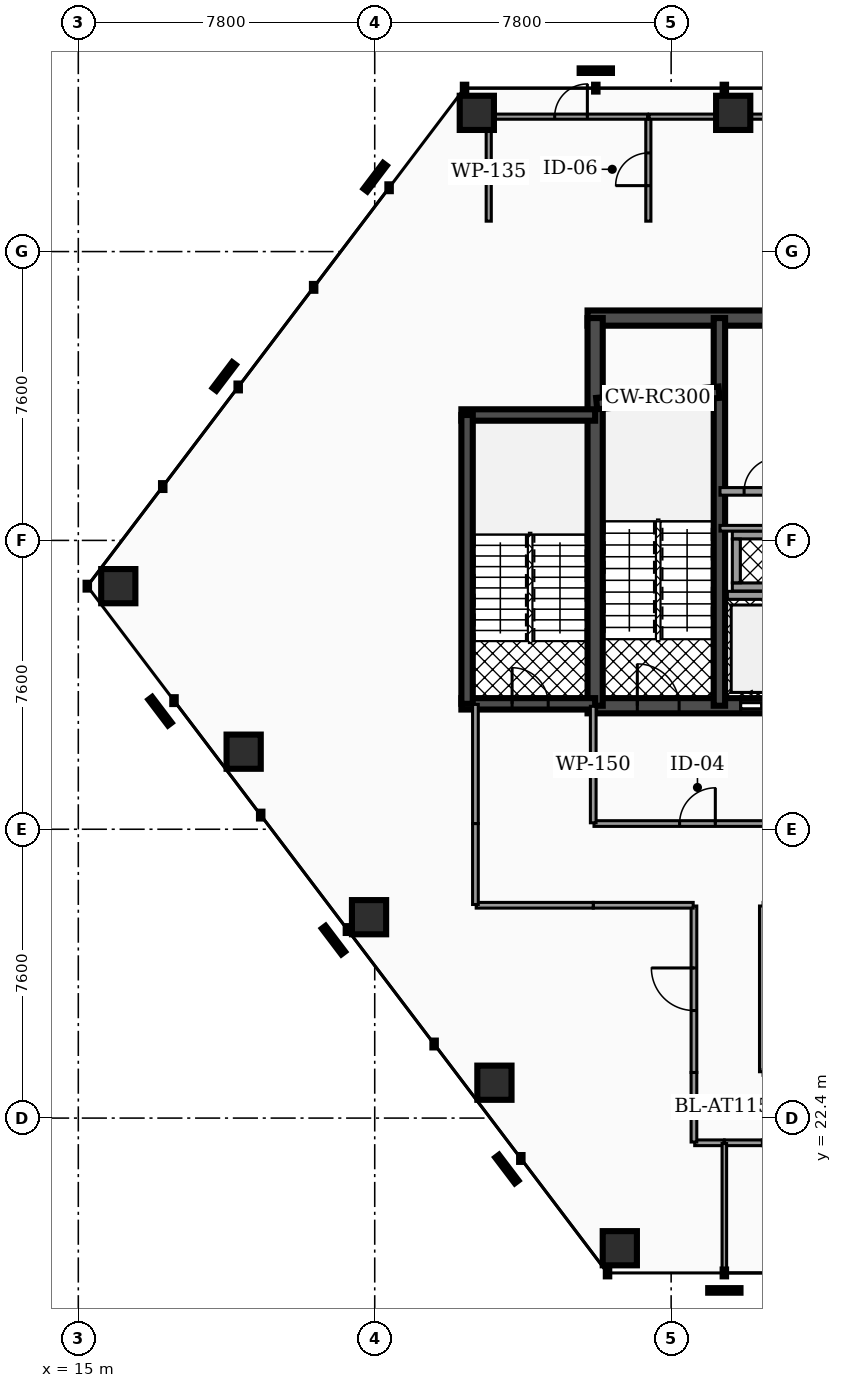
"""IFC4 building model, lengths in metres.
Left out: names, types, materials, properties, quantities, classifications, styles, units other than length and angle.
Written with IfcOpenShell. Run it as: python <this file> out.ifc"""

import sys

from ifc_helpers import new_model, si_unit, direction, frame, frame_2d, origin, origin_2d, place, context, subcontext, project, spatial, rectangle, hollow_rectangle, extrude, element, fill, save


model = new_model("IFC4")
c1 = context("Model", 3, precision=1e-05, world=origin(), true_north=direction((0.0, 1.0)))
c2 = subcontext(c1, "Body", "Model", "MODEL_VIEW")
j1 = project(units=[si_unit("LENGTHUNIT", "METRE"), si_unit("PLANEANGLEUNIT", "RADIAN")], contexts=[c1])
p1 = place(None, origin())
s1 = spatial("IfcSite", under=j1, at=p1, CompositionType="ELEMENT")
p2 = place(p1, origin())
s2 = spatial("IfcBuilding", under=s1, at=p2, CompositionType="ELEMENT")
p3 = place(p2, frame((0.0, 0.0, 100.98)))
s3 = spatial("IfcBuildingStorey", under=s2, at=p3, CompositionType="ELEMENT", Elevation=100.98)
p4 = place(p3, frame((28.4, 43.45, 0.0), z_axis=(0.0, 0.0, 1.0), x_axis=(1.0, 0.0, 0.0)))
e1 = element("IfcWall", 1, at=p4, inside=s3, PredefinedType="SHEAR", context=c2, shape_type="SweptSolid", body=[
    extrude(rectangle(XDim=20.06, YDim=0.4, at=frame_2d((10.03, 0.0))), origin(), (0.0, 0.0, 1.0), 3.82),
])
p5 = place(p3, frame((28.4, 33.25, 0.0), z_axis=(0.0, 0.0, 1.0), x_axis=(1.0, 0.0, 0.0)))
e2 = element("IfcWall", 2, at=p5, inside=s3, PredefinedType="SHEAR", context=c2, shape_type="SweptSolid", body=[
    extrude(rectangle(XDim=20.06, YDim=0.4, at=frame_2d((10.03, 0.0))), origin(), (0.0, 0.0, 1.0), 3.82),
])
p6 = place(p5, frame((4.03, 0.0, 0.0)))
e3 = element("IfcOpeningElement", 3, at=p6, cuts=e2, PredefinedType="OPENING", context=c2, shape_type="SweptSolid", body=[
    extrude(rectangle(XDim=1.1, YDim=2.15, at=frame_2d((0.55, 1.075))), frame((0.0, 0.21, 0.0), z_axis=(0.0, -1.0, 0.0), x_axis=(1.0, 0.0, 0.0)), (0.0, 0.0, 1.0), 0.42),
])
p7 = place(p5, frame((14.87, 0.0, 0.0)))
e4 = element("IfcOpeningElement", 4, at=p7, cuts=e2, PredefinedType="OPENING", context=c2, shape_type="SweptSolid", body=[
    extrude(rectangle(XDim=1.1, YDim=2.15, at=frame_2d((0.55, 1.075))), frame((0.0, 0.21, 0.0), z_axis=(0.0, -1.0, 0.0), x_axis=(1.0, 0.0, 0.0)), (0.0, 0.0, 1.0), 0.42),
])
p8 = place(p5, frame((1.31, 0.0, 0.0)))
e5 = element("IfcOpeningElement", 5, at=p8, cuts=e2, PredefinedType="OPENING", context=c2, shape_type="SweptSolid", body=[
    extrude(rectangle(XDim=1.1, YDim=2.2, at=frame_2d((0.55, 1.1))), frame((0.0, 0.21, 0.0), z_axis=(0.0, -1.0, 0.0), x_axis=(1.0, 0.0, 0.0)), (0.0, 0.0, 1.0), 0.42),
])
p9 = place(p5, frame((9.44, 0.0, 0.0)))
e6 = element("IfcOpeningElement", 6, at=p9, cuts=e2, PredefinedType="OPENING", context=c2, shape_type="SweptSolid", body=[
    extrude(rectangle(XDim=1.12, YDim=2.05, at=frame_2d((0.56, 1.025))), frame((0.0, 0.21, 0.0), z_axis=(0.0, -1.0, 0.0), x_axis=(1.0, 0.0, 0.0)), (0.0, 0.0, 1.0), 0.42),
])
p10 = place(p5, frame((17.65, 0.0, 0.0)))
e7 = element("IfcOpeningElement", 7, at=p10, cuts=e2, PredefinedType="OPENING", context=c2, shape_type="SweptSolid", body=[
    extrude(rectangle(XDim=1.1, YDim=2.2, at=frame_2d((0.55, 1.1))), frame((0.0, 0.21, 0.0), z_axis=(0.0, -1.0, 0.0), x_axis=(1.0, 0.0, 0.0)), (0.0, 0.0, 1.0), 0.42),
])
p11 = place(p3, frame((28.6, 33.25, 0.0), z_axis=(0.0, 0.0, 1.0), x_axis=(0.0, 1.0, 0.0)))
e8 = element("IfcWall", 8, at=p11, inside=s3, PredefinedType="SHEAR", context=c2, shape_type="SweptSolid", body=[
    extrude(rectangle(XDim=10.2, YDim=0.4, at=frame_2d((5.1, 0.0))), origin(), (0.0, 0.0, 1.0), 3.82),
])
p12 = place(p3, frame((31.87, 33.25, 0.0), z_axis=(0.0, 0.0, 1.0), x_axis=(0.0, 1.0, 0.0)))
e9 = element("IfcWall", 9, at=p12, inside=s3, PredefinedType="SHEAR", context=c2, shape_type="SweptSolid", body=[
    extrude(rectangle(XDim=10.2, YDim=0.3, at=frame_2d((5.1, 0.0))), origin(), (0.0, 0.0, 1.0), 3.82),
])
p13 = place(p3, frame((28.64, 41.2, 0.0), z_axis=(0.0, 0.0, 1.0), x_axis=(0.995687118776, 0.092774789157, 0.0)))
e10 = element("IfcWall", 10, at=p13, inside=s3, PredefinedType="SHEAR", context=c2, shape_type="SweptSolid", body=[
    extrude(rectangle(XDim=3.234, YDim=0.3, at=frame_2d((1.617, 0.0))), origin(), (0.0, 0.0, 1.0), 3.82),
])
p14 = place(p3, frame((25.08, 40.9, 0.0), z_axis=(0.0, 0.0, 1.0), x_axis=(1.0, 0.0, 0.0)))
e11 = element("IfcWall", 11, at=p14, inside=s3, PredefinedType="SHEAR", context=c2, shape_type="SweptSolid", body=[
    extrude(rectangle(XDim=3.52, YDim=0.3, at=frame_2d((1.76, 0.0))), origin(), (0.0, 0.0, 1.0), 3.82),
])
p15 = place(p3, frame((25.08, 33.3, 0.0), z_axis=(0.0, 0.0, 1.0), x_axis=(1.0, 0.0, 0.0)))
e12 = element("IfcWall", 12, at=p15, inside=s3, PredefinedType="SHEAR", context=c2, shape_type="SweptSolid", body=[
    extrude(rectangle(XDim=3.52, YDim=0.3, at=frame_2d((1.76, 0.0))), origin(), (0.0, 0.0, 1.0), 3.82),
])
p16 = place(p15, frame((1.335, 0.0, 0.0)))
e13 = element("IfcOpeningElement", 13, at=p16, cuts=e12, PredefinedType="OPENING", context=c2, shape_type="SweptSolid", body=[
    extrude(rectangle(XDim=0.95, YDim=2.2, at=frame_2d((0.475, 1.1))), frame((0.0, 0.16, 0.0), z_axis=(0.0, -1.0, 0.0), x_axis=(1.0, 0.0, 0.0)), (0.0, 0.0, 1.0), 0.32),
])
p17 = place(p3, frame((25.23, 33.3, 0.0), z_axis=(0.0, 0.0, 1.0), x_axis=(0.0, 1.0, 0.0)))
e14 = element("IfcWall", 14, at=p17, inside=s3, PredefinedType="SHEAR", context=c2, shape_type="SweptSolid", body=[
    extrude(rectangle(XDim=7.6, YDim=0.3, at=frame_2d((3.8, 0.0))), origin(), (0.0, 0.0, 1.0), 3.82),
])
for number, where, z_axis, x_axis in (
    (15, (32.233, 48.85, 0.0), (0.0, 0.0, 1.0), (1.0, 0.0, 0.0)),
    (16, (25.487, 48.85, 0.0), (0.0, 0.0, 1.0), (1.0, 0.0, 0.0)),
    (17, (16.052, 36.396, 0.0), (0.0, 0.0, 1.0), (1.0, 0.0, 0.0)),
    (18, (19.351, 32.041, 0.0), (0.0, 0.0, 1.0), (1.0, 0.0, 0.0)),
    (19, (22.65, 27.686, 0.0), (0.0, 0.0, 1.0), (1.0, 0.0, 0.0)),
    (20, (25.95, 23.331, 0.0), (0.0, 0.0, 1.0), (1.0, 0.0, 0.0)),
    (21, (29.249, 18.976, 0.0), (0.0, 0.0, 1.0), (1.0, 0.0, 0.0)),
):
    element("IfcColumn", number, at=place(p3, frame(where, z_axis=z_axis, x_axis=x_axis)), inside=s3, PredefinedType="COLUMN", context=c2, shape_type="SweptSolid", body=[
        extrude(hollow_rectangle(XDim=0.9, YDim=0.9, WallThickness=0.045, at=origin_2d()), origin(), (0.0, 0.0, 1.0), 3.82),
    ])
p18 = place(p3, frame((32.08, 36.155, 0.0), z_axis=(0.0, 0.0, 1.0), x_axis=(1.0, 0.0, 0.0)))
e22 = element("IfcWall", 22, at=p18, inside=s3, PredefinedType="SOLIDWALL", context=c2, shape_type="SweptSolid", body=[
    extrude(rectangle(XDim=1.8, YDim=0.21, at=frame_2d((0.9, 0.0))), origin(), (0.0, 0.0, 1.0), 2.792),
])
for number, where, z_axis, x_axis in (
    (23, (32.21, 36.375, 0.0), (0.0, 0.0, 1.0), (1.0, 0.0, 0.0)),
    (24, (32.21, 37.745, 0.0), (0.0, 0.0, 1.0), (1.0, 0.0, 0.0)),
):
    element("IfcWall", number, at=place(p3, frame(where, z_axis=z_axis, x_axis=x_axis)), inside=s3, PredefinedType="SOLIDWALL", context=c2, shape_type="SweptSolid", body=[
        extrude(rectangle(XDim=1.6, YDim=0.21, at=frame_2d((0.8, 0.0))), origin(), (0.0, 0.0, 1.0), 3.82),
    ])
p19 = place(p3, frame((32.315, 36.485, 0.0), z_axis=(0.0, 0.0, 1.0), x_axis=(0.0, 1.0, 0.0)))
e25 = element("IfcWall", 25, at=p19, inside=s3, PredefinedType="SOLIDWALL", context=c2, shape_type="SweptSolid", body=[
    extrude(rectangle(XDim=1.15, YDim=0.21, at=frame_2d((0.575, 0.0))), origin(), (0.0, 0.0, 1.0), 3.82),
])
p20 = place(p3, frame((31.885, 37.92, 0.0), z_axis=(0.0, 0.0, 1.0), x_axis=(1.0, 0.0, 0.0)))
e26 = element("IfcWall", 26, at=p20, inside=s3, PredefinedType="PARTITIONING", context=c2, shape_type="SweptSolid", body=[
    extrude(rectangle(XDim=3.295, YDim=0.15, at=frame_2d((1.647, 0.0))), origin(), (0.0, 0.0, 1.0), 2.777),
])
p21 = place(p3, frame((31.885, 38.89, 0.0), z_axis=(0.0, 0.0, 1.0), x_axis=(1.0, 0.0, 0.0)))
e27 = element("IfcWall", 27, at=p21, inside=s3, PredefinedType="PARTITIONING", context=c2, shape_type="SweptSolid", body=[
    extrude(rectangle(XDim=2.15, YDim=0.2, at=frame_2d((1.075, 0.0))), origin(), (0.0, 0.0, 1.0), 2.777),
])
p22 = place(p21, frame((0.635, 0.0, 0.0)))
e28 = element("IfcOpeningElement", 28, at=p22, cuts=e27, PredefinedType="OPENING", context=c2, shape_type="SweptSolid", body=[
    extrude(rectangle(XDim=0.88, YDim=2.05, at=frame_2d((0.44, 1.025))), frame((0.0, 0.11, 0.0), z_axis=(0.0, -1.0, 0.0), x_axis=(1.0, 0.0, 0.0)), (0.0, 0.0, 1.0), 0.22),
])
p23 = place(p3, frame((28.57, 30.15, 0.0), z_axis=(0.0, 0.0, 1.0), x_axis=(1.0, 0.0, 0.0)))
e29 = element("IfcWall", 29, at=p23, inside=s3, PredefinedType="PARTITIONING", context=c2, shape_type="SweptSolid", body=[
    extrude(rectangle(XDim=5.445, YDim=0.15, at=frame_2d((2.722, 0.0))), origin(), (0.0, 0.0, 1.0), 2.777),
])
p24 = place(p23, frame((2.252, 0.0, 0.0)))
e30 = element("IfcOpeningElement", 30, at=p24, cuts=e29, PredefinedType="OPENING", context=c2, shape_type="SweptSolid", body=[
    extrude(rectangle(XDim=0.94, YDim=2.05, at=frame_2d((0.47, 1.025))), frame((0.0, 0.085, 0.0), z_axis=(0.0, -1.0, 0.0), x_axis=(1.0, 0.0, 0.0)), (0.0, 0.0, 1.0), 0.17),
])
p25 = place(p3, frame((28.55, 30.17, 0.0), z_axis=(0.0, 0.0, 1.0), x_axis=(0.0, 1.0, 0.0)))
e31 = element("IfcWall", 31, at=p25, inside=s3, PredefinedType="PARTITIONING", context=c2, shape_type="SweptSolid", body=[
    extrude(rectangle(XDim=3.065, YDim=0.15, at=frame_2d((1.533, 0.0))), origin(), (0.0, 0.0, 1.0), 2.777),
])
p26 = place(p3, frame((33.0, 21.75, 0.0), z_axis=(0.0, 0.0, 1.0), x_axis=(1.0, 0.0, 0.0)))
e32 = element("IfcWall", 32, at=p26, inside=s3, PredefinedType="PARTITIONING", context=c2, shape_type="SweptSolid", body=[
    extrude(rectangle(XDim=10.8, YDim=0.15, at=frame_2d((5.4, 0.0))), origin(), (0.0, 0.0, 1.0), 2.777),
])
p27 = place(p26, frame((4.93, 0.0, 0.0)))
e33 = element("IfcOpeningElement", 33, at=p27, cuts=e32, PredefinedType="OPENING", context=c2, shape_type="SweptSolid", body=[
    extrude(rectangle(XDim=0.94, YDim=2.05, at=frame_2d((0.47, 1.025))), frame((0.0, 0.085, 0.0), z_axis=(0.0, -1.0, 0.0), x_axis=(1.0, 0.0, 0.0)), (0.0, 0.0, 1.0), 0.17),
])
p28 = place(p3, frame((32.005, 21.75, 0.0), z_axis=(0.0, 0.0, 1.0), x_axis=(1.0, 0.0, 0.0)))
e34 = element("IfcWall", 34, at=p28, inside=s3, PredefinedType="PARTITIONING", context=c2, shape_type="SweptSolid", body=[
    extrude(rectangle(XDim=0.995, YDim=0.15, at=frame_2d((0.498, 0.0))), origin(), (0.0, 0.0, 1.0), 2.777),
])
p29 = place(p3, frame((31.22, 21.75, 0.0), z_axis=(0.0, 0.0, 1.0), x_axis=(1.0, 0.0, 0.0)))
e35 = element("IfcWall", 35, at=p29, inside=s3, PredefinedType="PARTITIONING", context=c2, shape_type="SweptSolid", body=[
    extrude(rectangle(XDim=0.775, YDim=0.15, at=frame_2d((0.388, 0.0))), origin(), (0.0, 0.0, 1.0), 2.777),
])
p30 = place(p3, frame((31.2, 21.77, 0.0), z_axis=(0.0, 0.0, 1.0), x_axis=(0.0, 1.0, 0.0)))
e36 = element("IfcWall", 36, at=p30, inside=s3, PredefinedType="PARTITIONING", context=c2, shape_type="SweptSolid", body=[
    extrude(rectangle(XDim=1.83, YDim=0.15, at=frame_2d((0.915, 0.0))), origin(), (0.0, 0.0, 1.0), 2.777),
])
p31 = place(p3, frame((31.2, 23.6, 0.0), z_axis=(0.0, 0.0, 1.0), x_axis=(0.0, 1.0, 0.0)))
e37 = element("IfcWall", 37, at=p31, inside=s3, PredefinedType="PARTITIONING", context=c2, shape_type="SweptSolid", body=[
    extrude(rectangle(XDim=4.38, YDim=0.15, at=frame_2d((2.19, 0.0))), origin(), (0.0, 0.0, 1.0), 2.777),
])
p32 = place(p31, frame((1.63, 0.0, 0.0)))
e38 = element("IfcOpeningElement", 38, at=p32, cuts=e37, PredefinedType="OPENING", context=c2, shape_type="SweptSolid", body=[
    extrude(rectangle(XDim=1.12, YDim=2.05, at=frame_2d((0.56, 1.025))), frame((0.0, 0.085, 0.0), z_axis=(0.0, -1.0, 0.0), x_axis=(1.0, 0.0, 0.0)), (0.0, 0.0, 1.0), 0.17),
])
p33 = place(p3, frame((28.55, 28.0, 0.0), z_axis=(0.0, 0.0, 1.0), x_axis=(1.0, 0.0, 0.0)))
e39 = element("IfcWall", 39, at=p33, inside=s3, PredefinedType="PARTITIONING", context=c2, shape_type="SweptSolid", body=[
    extrude(rectangle(XDim=2.63, YDim=0.15, at=frame_2d((1.315, 0.0))), origin(), (0.0, 0.0, 1.0), 2.777),
])
p34 = place(p3, frame((25.47, 28.0, 0.0), z_axis=(0.0, 0.0, 1.0), x_axis=(1.0, 0.0, 0.0)))
e40 = element("IfcWall", 40, at=p34, inside=s3, PredefinedType="PARTITIONING", context=c2, shape_type="SweptSolid", body=[
    extrude(rectangle(XDim=3.08, YDim=0.15, at=frame_2d((1.54, 0.0))), origin(), (0.0, 0.0, 1.0), 2.777),
])
p35 = place(p3, frame((25.45, 28.02, 0.0), z_axis=(0.0, 0.0, 1.0), x_axis=(0.0, 1.0, 0.0)))
e41 = element("IfcWall", 41, at=p35, inside=s3, PredefinedType="PARTITIONING", context=c2, shape_type="SweptSolid", body=[
    extrude(rectangle(XDim=2.13, YDim=0.15, at=frame_2d((1.065, 0.0))), origin(), (0.0, 0.0, 1.0), 2.777),
])
p36 = place(p3, frame((25.45, 30.15, 0.0), z_axis=(0.0, 0.0, 1.0), x_axis=(0.0, 1.0, 0.0)))
e42 = element("IfcWall", 42, at=p36, inside=s3, PredefinedType="PARTITIONING", context=c2, shape_type="SweptSolid", body=[
    extrude(rectangle(XDim=3.135, YDim=0.15, at=frame_2d((1.567, 0.0))), origin(), (0.0, 0.0, 1.0), 2.777),
])
p37 = place(p3, frame((33.0, 23.62, 0.0), z_axis=(0.0, 0.0, 1.0), x_axis=(0.0, 1.0, 0.0)))
e43 = element("IfcWall", 43, at=p37, inside=s3, PredefinedType="PARTITIONING", context=c2, shape_type="SweptSolid", body=[
    extrude(rectangle(XDim=4.36, YDim=0.15, at=frame_2d((2.18, 0.0))), origin(), (0.0, 0.0, 1.0), 2.777),
])
p38 = place(p3, frame((30.0, 46.0, 0.0), z_axis=(0.0, 0.0, 1.0), x_axis=(0.0, 1.0, 0.0)))
e44 = element("IfcWall", 44, at=p38, inside=s3, PredefinedType="PARTITIONING", context=c2, shape_type="SweptSolid", body=[
    extrude(rectangle(XDim=2.73, YDim=0.135, at=frame_2d((1.365, 0.0))), origin(), (0.0, 0.0, 1.0), 2.777),
])
p39 = place(p38, frame((0.935, 0.0, 0.0)))
e45 = element("IfcOpeningElement", 45, at=p39, cuts=e44, PredefinedType="OPENING", context=c2, shape_type="SweptSolid", body=[
    extrude(rectangle(XDim=0.86, YDim=2.05, at=frame_2d((0.43, 1.025))), frame((0.0, 0.077, 0.0), z_axis=(0.0, -1.0, 0.0), x_axis=(1.0, 0.0, 0.0)), (0.0, 0.0, 1.0), 0.155),
])
p40 = place(p3, frame((25.951, 48.75, 0.0), z_axis=(0.0, 0.0, 1.0), x_axis=(1.0, 0.0, 0.0)))
e46 = element("IfcWall", 46, at=p40, inside=s3, PredefinedType="PARTITIONING", context=c2, shape_type="SweptSolid", body=[
    extrude(rectangle(XDim=4.029, YDim=0.135, at=frame_2d((2.015, 0.0))), origin(), (0.0, 0.0, 1.0), 2.777),
])
p41 = place(p40, frame((1.584, 0.0, 0.0)))
e47 = element("IfcOpeningElement", 47, at=p41, cuts=e46, PredefinedType="OPENING", context=c2, shape_type="SweptSolid", body=[
    extrude(rectangle(XDim=0.86, YDim=2.05, at=frame_2d((0.43, 1.025))), frame((0.0, 0.077, 0.0), z_axis=(0.0, -1.0, 0.0), x_axis=(1.0, 0.0, 0.0)), (0.0, 0.0, 1.0), 0.155),
])
p42 = place(p3, frame((25.8, 46.0, 0.0), z_axis=(0.0, 0.0, 1.0), x_axis=(0.0, 1.0, 0.0)))
e48 = element("IfcWall", 48, at=p42, inside=s3, PredefinedType="PARTITIONING", context=c2, shape_type="SweptSolid", body=[
    extrude(rectangle(XDim=2.599, YDim=0.135, at=frame_2d((1.3, 0.0))), origin(), (0.0, 0.0, 1.0), 2.777),
])
p43 = place(p3, frame((30.02, 48.75, 0.0), z_axis=(0.0, 0.0, 1.0), x_axis=(1.0, 0.0, 0.0)))
e49 = element("IfcWall", 49, at=p43, inside=s3, PredefinedType="PARTITIONING", context=c2, shape_type="SweptSolid", body=[
    extrude(rectangle(XDim=1.755, YDim=0.135, at=frame_2d((0.877, 0.0))), origin(), (0.0, 0.0, 1.0), 2.777),
])
p44 = place(p3, frame((32.198, 48.75, 0.0), z_axis=(0.0, 0.0, 1.0), x_axis=(1.0, 0.0, 0.0)))
e50 = element("IfcWall", 50, at=p44, inside=s3, PredefinedType="PARTITIONING", context=c2, shape_type="SweptSolid", body=[
    extrude(rectangle(XDim=1.982, YDim=0.135, at=frame_2d((0.991, 0.0))), origin(), (0.0, 0.0, 1.0), 2.777),
])
p45 = place(p3, frame((32.0, 18.341, 0.0), z_axis=(0.0, 0.0, 1.0), x_axis=(0.0, 1.0, 0.0)))
e51 = element("IfcWall", 51, at=p45, inside=s3, PredefinedType="PARTITIONING", context=c2, shape_type="SweptSolid", body=[
    extrude(rectangle(XDim=3.389, YDim=0.12, at=frame_2d((1.695, 0.0))), origin(), (0.0, 0.0, 1.0), 2.777),
])
p46 = place(p3, frame((32.0, 48.977, 0.0), z_axis=(0.0, 0.0, 1.0), x_axis=(0.0, 1.0, 0.0)))
e52 = element("IfcWall", 52, at=p46, inside=s3, PredefinedType="PARTITIONING", context=c2, shape_type="SweptSolid", body=[
    extrude(rectangle(XDim=0.509, YDim=0.12, at=frame_2d((0.254, 0.0))), origin(), (0.0, 0.0, 1.0), 2.777),
])
p47 = place(p6, origin())
e53 = element("IfcDoor", 53, at=p47, inside=s3, OperationType="SLIDING_TO_LEFT", PredefinedType="DOOR", context=c2, shape_type="SweptSolid", body=[
    extrude(rectangle(XDim=1.1, YDim=2.15, at=frame_2d((0.55, 1.075))), frame((0.0, 0.025, 0.0), z_axis=(0.0, -1.0, 0.0), x_axis=(1.0, 0.0, 0.0)), (0.0, 0.0, 1.0), 0.05),
])
fill(e3, e53)
p48 = place(p8, origin())
e54 = element("IfcDoor", 54, at=p48, inside=s3, OperationType="SINGLE_SWING_LEFT", PredefinedType="DOOR", context=c2, shape_type="SweptSolid", body=[
    extrude(rectangle(XDim=1.1, YDim=2.2, at=frame_2d((0.55, 1.1))), frame((0.0, 0.025, 0.0), z_axis=(0.0, -1.0, 0.0), x_axis=(1.0, 0.0, 0.0)), (0.0, 0.0, 1.0), 0.05),
])
fill(e5, e54)
p49 = place(p16, origin())
e55 = element("IfcDoor", 55, at=p49, inside=s3, OperationType="SINGLE_SWING_LEFT", PredefinedType="DOOR", context=c2, shape_type="SweptSolid", body=[
    extrude(rectangle(XDim=0.95, YDim=2.2, at=frame_2d((0.475, 1.1))), frame((0.0, 0.025, 0.0), z_axis=(0.0, -1.0, 0.0), x_axis=(1.0, 0.0, 0.0)), (0.0, 0.0, 1.0), 0.05),
])
fill(e13, e55)
p50 = place(p22, origin())
e56 = element("IfcDoor", 56, at=p50, inside=s3, OperationType="SINGLE_SWING_RIGHT", PredefinedType="DOOR", context=c2, shape_type="SweptSolid", body=[
    extrude(rectangle(XDim=0.88, YDim=2.05, at=frame_2d((0.44, 1.025))), frame((0.0, 0.025, 0.0), z_axis=(0.0, -1.0, 0.0), x_axis=(1.0, 0.0, 0.0)), (0.0, 0.0, 1.0), 0.05),
])
fill(e28, e56)
p51 = place(p24, origin())
e57 = element("IfcDoor", 57, at=p51, inside=s3, OperationType="SINGLE_SWING_RIGHT", PredefinedType="DOOR", context=c2, shape_type="SweptSolid", body=[
    extrude(rectangle(XDim=0.94, YDim=2.05, at=frame_2d((0.47, 1.025))), frame((0.0, 0.025, 0.0), z_axis=(0.0, -1.0, 0.0), x_axis=(1.0, 0.0, 0.0)), (0.0, 0.0, 1.0), 0.05),
])
fill(e30, e57)
p52 = place(p32, origin())
e58 = element("IfcDoor", 58, at=p52, inside=s3, OperationType="SINGLE_SWING_RIGHT", PredefinedType="DOOR", context=c2, shape_type="SweptSolid", body=[
    extrude(rectangle(XDim=1.12, YDim=2.05, at=frame_2d((0.56, 1.025))), frame((0.0, 0.025, 0.0), z_axis=(0.0, -1.0, 0.0), x_axis=(1.0, 0.0, 0.0)), (0.0, 0.0, 1.0), 0.05),
])
fill(e38, e58)
p53 = place(p39, origin())
e59 = element("IfcDoor", 59, at=p53, inside=s3, OperationType="SINGLE_SWING_LEFT", PredefinedType="DOOR", context=c2, shape_type="SweptSolid", body=[
    extrude(rectangle(XDim=0.86, YDim=2.05, at=frame_2d((0.43, 1.025))), frame((0.0, 0.025, 0.0), z_axis=(0.0, -1.0, 0.0), x_axis=(1.0, 0.0, 0.0)), (0.0, 0.0, 1.0), 0.05),
])
fill(e45, e59)
p54 = place(p41, origin())
e60 = element("IfcDoor", 60, at=p54, inside=s3, OperationType="SINGLE_SWING_RIGHT", PredefinedType="DOOR", context=c2, shape_type="SweptSolid", body=[
    extrude(rectangle(XDim=0.86, YDim=2.05, at=frame_2d((0.43, 1.025))), frame((0.0, 0.025, 0.0), z_axis=(0.0, -1.0, 0.0), x_axis=(1.0, 0.0, 0.0)), (0.0, 0.0, 1.0), 0.05),
])
fill(e47, e60)
save(model, sys.argv[1])
